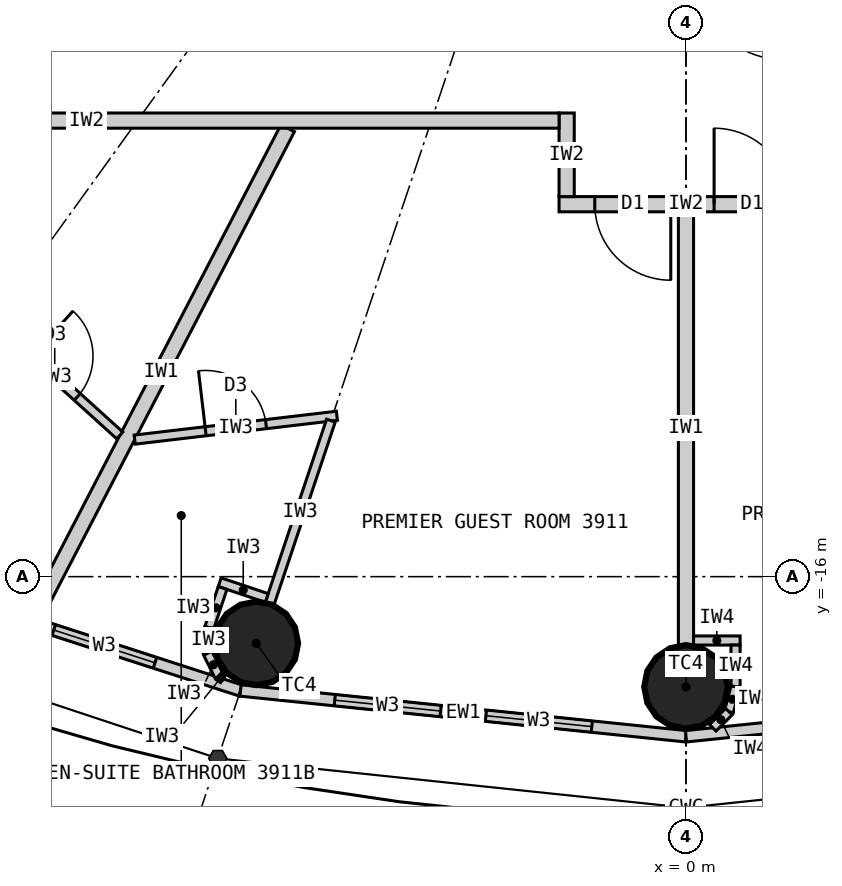
"""IFC4 building model, lengths in metres.
Left out: names, types, materials, properties, quantities, classifications, styles, units other than length and angle.
Written with IfcOpenShell. Run it as: python <this file> out.ifc"""

import sys

from ifc_helpers import new_model, si_unit, direction, frame, frame_2d, origin, origin_2d, place, context, subcontext, project, spatial, rectangle, circle, extrude, element, fill, save


model = new_model("IFC4")
c1 = context("Model", 3, precision=1e-05, world=origin(), true_north=direction((0.0, 1.0)))
c2 = subcontext(c1, "Body", "Model", "MODEL_VIEW")
j1 = project(units=[si_unit("LENGTHUNIT", "METRE"), si_unit("PLANEANGLEUNIT", "RADIAN")], contexts=[c1])
p1 = place(None, origin())
s1 = spatial("IfcSite", under=j1, at=p1, CompositionType="ELEMENT")
p2 = place(p1, origin())
s2 = spatial("IfcBuilding", under=s1, at=p2, CompositionType="ELEMENT")
p3 = place(p2, frame((0.0, 0.0, 150.0)))
s3 = spatial("IfcBuildingStorey", under=s2, at=p3, CompositionType="ELEMENT", Elevation=150.0)
for number, where, z_axis, x_axis in (
    (1, (-5.653, -16.877, 0.0), (0.0, 0.0, 1.0), (1.0, 0.0, 0.0)),
    (2, (0.0, -17.45, 0.0), (0.0, 0.0, 1.0), (1.0, 0.0, 0.0)),
):
    element("IfcColumn", number, at=place(p3, frame(where, z_axis=z_axis, x_axis=x_axis)), inside=s3, PredefinedType="COLUMN", context=c2, shape_type="SweptSolid", body=[
        extrude(circle(Radius=0.55, at=origin_2d()), origin(), (0.0, 0.0, 1.0), 3.3),
    ])
p4 = place(p3, frame((-11.346, -15.722, 0.0), z_axis=(0.0, 0.0, 1.0), x_axis=(0.951432482129, -0.307857486429, 0.0)))
e3 = element("IfcWall", 3, at=p4, inside=s3, PredefinedType="ELEMENTEDWALL", context=c2, shape_type="SweptSolid", body=[
    extrude(rectangle(XDim=5.766, YDim=0.15, at=frame_2d((2.883, 0.0))), origin(), (0.0, 0.0, 1.0), 3.12),
])
p5 = place(p4, frame((1.183, 0.0, 0.9)))
e4 = element("IfcOpeningElement", 4, at=p5, cuts=e3, PredefinedType="OPENING", context=c2, shape_type="SweptSolid", body=[
    extrude(rectangle(XDim=1.4, YDim=1.9, at=frame_2d((0.7, 0.95))), frame((0.0, 0.085, 0.0), z_axis=(0.0, -1.0, 0.0), x_axis=(1.0, 0.0, 0.0)), (0.0, 0.0, 1.0), 0.17),
])
p6 = place(p4, frame((3.183, 0.0, 0.9)))
e5 = element("IfcOpeningElement", 5, at=p6, cuts=e3, PredefinedType="OPENING", context=c2, shape_type="SweptSolid", body=[
    extrude(rectangle(XDim=1.4, YDim=1.9, at=frame_2d((0.7, 0.95))), frame((0.0, 0.085, 0.0), z_axis=(0.0, -1.0, 0.0), x_axis=(1.0, 0.0, 0.0)), (0.0, 0.0, 1.0), 0.17),
])
p7 = place(p3, frame((-5.86, -17.497, 0.0), z_axis=(0.0, 0.0, 1.0), x_axis=(0.994751738032, -0.102318032045, 0.0)))
e6 = element("IfcWall", 6, at=p7, inside=s3, PredefinedType="ELEMENTEDWALL", context=c2, shape_type="SweptSolid", body=[
    extrude(rectangle(XDim=5.891, YDim=0.15, at=frame_2d((2.946, 0.0))), origin(), (0.0, 0.0, 1.0), 3.12),
])
p8 = place(p7, frame((1.246, 0.0, 0.9)))
e7 = element("IfcOpeningElement", 7, at=p8, cuts=e6, PredefinedType="OPENING", context=c2, shape_type="SweptSolid", body=[
    extrude(rectangle(XDim=1.4, YDim=1.9, at=frame_2d((0.7, 0.95))), frame((0.0, 0.085, 0.0), z_axis=(0.0, -1.0, 0.0), x_axis=(1.0, 0.0, 0.0)), (0.0, 0.0, 1.0), 0.17),
])
p9 = place(p7, frame((3.246, 0.0, 0.9)))
e8 = element("IfcOpeningElement", 8, at=p9, cuts=e6, PredefinedType="OPENING", context=c2, shape_type="SweptSolid", body=[
    extrude(rectangle(XDim=1.4, YDim=1.9, at=frame_2d((0.7, 0.95))), frame((0.0, 0.085, 0.0), z_axis=(0.0, -1.0, 0.0), x_axis=(1.0, 0.0, 0.0)), (0.0, 0.0, 1.0), 0.17),
])
p10 = place(p3, frame((0.0, -18.1, 0.0), z_axis=(0.0, 0.0, 1.0), x_axis=(0.994751738032, 0.102318032045, 0.0)))
e9 = element("IfcWall", 9, at=p10, inside=s3, PredefinedType="ELEMENTEDWALL", context=c2, shape_type="SweptSolid", body=[
    extrude(rectangle(XDim=5.891, YDim=0.15, at=frame_2d((2.946, 0.0))), origin(), (0.0, 0.0, 1.0), 3.12),
])
p11 = place(p10, frame((1.246, 0.0, 0.9)))
e10 = element("IfcOpeningElement", 10, at=p11, cuts=e9, PredefinedType="OPENING", context=c2, shape_type="SweptSolid", body=[
    extrude(rectangle(XDim=1.4, YDim=1.9, at=frame_2d((0.7, 0.95))), frame((0.0, 0.085, 0.0), z_axis=(0.0, -1.0, 0.0), x_axis=(1.0, 0.0, 0.0)), (0.0, 0.0, 1.0), 0.17),
])
p12 = place(p10, frame((3.246, 0.0, 0.9)))
e11 = element("IfcOpeningElement", 11, at=p12, cuts=e9, PredefinedType="OPENING", context=c2, shape_type="SweptSolid", body=[
    extrude(rectangle(XDim=1.4, YDim=1.9, at=frame_2d((0.7, 0.95))), frame((0.0, 0.085, 0.0), z_axis=(0.0, -1.0, 0.0), x_axis=(1.0, 0.0, 0.0)), (0.0, 0.0, 1.0), 0.17),
])
p13 = place(p3, frame((-5.24, -10.1, 0.0), z_axis=(0.0, 0.0, 1.0), x_axis=(-0.460532965373, -0.887642601391, 0.0)))
e12 = element("IfcWall", 12, at=p13, inside=s3, PredefinedType="PARTITIONING", context=c2, shape_type="SweptSolid", body=[
    extrude(rectangle(XDim=7.231, YDim=0.2, at=frame_2d((3.616, 0.0))), origin(), (0.0, 0.0, 1.0), 3.12),
])
p14 = place(p3, frame((0.0, -11.2, 0.0), z_axis=(0.0, 0.0, 1.0), x_axis=(0.0, -1.0, 0.0)))
e13 = element("IfcWall", 13, at=p14, inside=s3, PredefinedType="PARTITIONING", context=c2, shape_type="SweptSolid", body=[
    extrude(rectangle(XDim=5.7, YDim=0.2, at=frame_2d((2.85, 0.0))), origin(), (0.0, 0.0, 1.0), 2.42),
])
p15 = place(p3, frame((1.67, -11.1, 0.0), z_axis=(0.0, 0.0, 1.0), x_axis=(-1.0, 0.0, 0.0)))
e14 = element("IfcWall", 14, at=p15, inside=s3, PredefinedType="PARTITIONING", context=c2, shape_type="SweptSolid", body=[
    extrude(rectangle(XDim=3.34, YDim=0.2, at=frame_2d((1.67, 0.0))), origin(), (0.0, 0.0, 1.0), 3.12),
])
p16 = place(p15, frame((1.87, 0.0, 0.0)))
e15 = element("IfcOpeningElement", 15, at=p16, cuts=e14, PredefinedType="OPENING", context=c2, shape_type="SweptSolid", body=[
    extrude(rectangle(XDim=1.0, YDim=2.2, at=frame_2d((0.5, 1.1))), frame((0.0, 0.11, 0.0), z_axis=(0.0, -1.0, 0.0), x_axis=(1.0, 0.0, 0.0)), (0.0, 0.0, 1.0), 0.22),
])
p17 = place(p15, frame((0.3, 0.0, 0.0)))
e16 = element("IfcOpeningElement", 16, at=p17, cuts=e14, PredefinedType="OPENING", context=c2, shape_type="SweptSolid", body=[
    extrude(rectangle(XDim=1.0, YDim=2.2, at=frame_2d((0.5, 1.1))), frame((0.0, 0.11, 0.0), z_axis=(0.0, -1.0, 0.0), x_axis=(1.0, 0.0, 0.0)), (0.0, 0.0, 1.0), 0.22),
])
p18 = place(p3, frame((-1.57, -9.9, 0.0), z_axis=(0.0, 0.0, 1.0), x_axis=(0.0, -1.0, 0.0)))
e17 = element("IfcWall", 17, at=p18, inside=s3, PredefinedType="PARTITIONING", context=c2, shape_type="SweptSolid", body=[
    extrude(rectangle(XDim=1.1, YDim=0.2, at=frame_2d((0.55, 0.0))), origin(), (0.0, 0.0, 1.0), 3.12),
])
p19 = place(p3, frame((-7.45, -14.142, 0.0), z_axis=(0.0, 0.0, 1.0), x_axis=(-0.74113984586, 0.671350675041, 0.0)))
e18 = element("IfcWall", 18, at=p19, inside=s3, PredefinedType="PARTITIONING", context=c2, shape_type="SweptSolid", body=[
    extrude(rectangle(XDim=2.309, YDim=0.12, at=frame_2d((1.154, 0.0))), origin(), (0.0, 0.0, 1.0), 3.12),
])
p20 = place(p19, frame((0.754, 0.0, 0.0)))
e19 = element("IfcOpeningElement", 19, at=p20, cuts=e18, PredefinedType="OPENING", context=c2, shape_type="SweptSolid", body=[
    extrude(rectangle(XDim=0.8, YDim=2.1, at=frame_2d((0.4, 1.05))), frame((0.0, 0.07, 0.0), z_axis=(0.0, -1.0, 0.0), x_axis=(1.0, 0.0, 0.0)), (0.0, 0.0, 1.0), 0.14),
])
p21 = place(p3, frame((-7.253, -14.197, 0.0), z_axis=(0.0, 0.0, 1.0), x_axis=(0.993128188393, 0.117031625725, 0.0)))
e20 = element("IfcWall", 20, at=p21, inside=s3, PredefinedType="PARTITIONING", context=c2, shape_type="SweptSolid", body=[
    extrude(rectangle(XDim=2.678, YDim=0.12, at=frame_2d((1.339, 0.0))), origin(), (0.0, 0.0, 1.0), 3.12),
])
p22 = place(p21, frame((0.939, 0.0, 0.0)))
e21 = element("IfcOpeningElement", 21, at=p22, cuts=e20, PredefinedType="OPENING", context=c2, shape_type="SweptSolid", body=[
    extrude(rectangle(XDim=0.8, YDim=2.1, at=frame_2d((0.4, 1.05))), frame((0.0, 0.07, 0.0), z_axis=(0.0, -1.0, 0.0), x_axis=(1.0, 0.0, 0.0)), (0.0, 0.0, 1.0), 0.14),
])
p23 = place(p3, frame((-4.671, -13.948, 0.0), z_axis=(0.0, 0.0, 1.0), x_axis=(-0.317669167093, -0.948201613729, 0.0)))
e22 = element("IfcWall", 22, at=p23, inside=s3, PredefinedType="PARTITIONING", context=c2, shape_type="SweptSolid", body=[
    extrude(rectangle(XDim=2.54, YDim=0.12, at=frame_2d((1.27, 0.0))), origin(), (0.0, 0.0, 1.0), 2.42),
])
p24 = place(p3, frame((-5.516, -16.28, 0.0), z_axis=(0.0, 0.0, 1.0), x_axis=(-0.948157944392, 0.317799484717, 0.0)))
e23 = element("IfcWall", 23, at=p24, inside=s3, PredefinedType="PARTITIONING", context=c2, shape_type="SweptSolid", body=[
    extrude(rectangle(XDim=0.652, YDim=0.12, at=frame_2d((0.326, 0.0))), origin(), (0.0, 0.0, 1.0), 3.12),
])
p25 = place(p3, frame((-6.097, -16.149, 0.0), z_axis=(0.0, 0.0, 1.0), x_axis=(-0.317292604854, -0.948327687514, 0.0)))
e24 = element("IfcWall", 24, at=p25, inside=s3, PredefinedType="PARTITIONING", context=c2, shape_type="SweptSolid", body=[
    extrude(rectangle(XDim=0.55, YDim=0.12, at=frame_2d((0.275, 0.0))), origin(), (0.0, 0.0, 1.0), 3.12),
])
for number, where, z_axis, x_axis in (
    (25, (-6.271, -16.67, 0.0), (0.0, 0.0, 1.0), (-0.061, -0.998, 0.0)),
    (26, (-6.292, -17.007, 0.0), (0.0, 0.0, 1.0), (0.445, -0.895, 0.0)),
):
    element("IfcWall", number, at=place(p3, frame(where, z_axis=z_axis, x_axis=x_axis)), inside=s3, PredefinedType="PARTITIONING", context=c2, shape_type="SweptSolid", body=[
        extrude(rectangle(XDim=0.338, YDim=0.12, at=frame_2d((0.169, 0.0))), origin(), (0.0, 0.0, 1.0), 3.12),
    ])
p26 = place(p3, frame((-6.142, -17.31, 0.0), z_axis=(0.0, 0.0, 1.0), x_axis=(0.835039693181, -0.550189704386, 0.0)))
e27 = element("IfcWall", 27, at=p26, inside=s3, PredefinedType="PARTITIONING", context=c2, shape_type="SweptSolid", body=[
    extrude(rectangle(XDim=0.062, YDim=0.12, at=frame_2d((0.031, 0.0))), origin(), (0.0, 0.0, 1.0), 3.12),
])
p27 = place(p3, frame((-1.67, -10.0, 0.0), z_axis=(0.0, 0.0, 1.0), x_axis=(-1.0, 0.0, 0.0)))
e28 = element("IfcWall", 28, at=p27, inside=s3, PredefinedType="PARTITIONING", context=c2, shape_type="SweptSolid", body=[
    extrude(rectangle(XDim=12.43, YDim=0.2, at=frame_2d((6.215, 0.0))), origin(), (0.0, 0.0, 1.0), 3.12),
])
p28 = place(p27, frame((9.655, 0.0, 0.0)))
e29 = element("IfcOpeningElement", 29, at=p28, cuts=e28, PredefinedType="OPENING", context=c2, shape_type="SweptSolid", body=[
    extrude(rectangle(XDim=1.0, YDim=2.2, at=frame_2d((0.5, 1.1))), frame((0.0, 0.11, 0.0), z_axis=(0.0, -1.0, 0.0), x_axis=(1.0, 0.0, 0.0)), (0.0, 0.0, 1.0), 0.22),
])
p29 = place(p3, frame((0.1, -16.84, 0.0), z_axis=(0.0, 0.0, 1.0), x_axis=(1.0, 0.0, 0.0)))
e30 = element("IfcWall", 30, at=p29, inside=s3, PredefinedType="PARTITIONING", context=c2, shape_type="SweptSolid", body=[
    extrude(rectangle(XDim=0.612, YDim=0.12, at=frame_2d((0.306, 0.0))), origin(), (0.0, 0.0, 1.0), 3.12),
])
p30 = place(p3, frame((0.652, -16.9, 0.0), z_axis=(0.0, 0.0, 1.0), x_axis=(0.0, -1.0, 0.0)))
e31 = element("IfcWall", 31, at=p30, inside=s3, PredefinedType="PARTITIONING", context=c2, shape_type="SweptSolid", body=[
    extrude(rectangle(XDim=0.55, YDim=0.12, at=frame_2d((0.275, 0.0))), origin(), (0.0, 0.0, 1.0), 3.12),
])
p31 = place(p3, frame((0.652, -17.45, 0.0), z_axis=(0.0, 0.0, 1.0), x_axis=(-0.258832454679, -0.965922233104, 0.0)))
e32 = element("IfcWall", 32, at=p31, inside=s3, PredefinedType="PARTITIONING", context=c2, shape_type="SweptSolid", body=[
    extrude(rectangle(XDim=0.338, YDim=0.12, at=frame_2d((0.169, 0.0))), origin(), (0.0, 0.0, 1.0), 3.12),
])
p32 = place(p3, frame((0.565, -17.776, 0.0), z_axis=(0.0, 0.0, 1.0), x_axis=(-0.707106781187, -0.707106781187, 0.0)))
e33 = element("IfcWall", 33, at=p32, inside=s3, PredefinedType="PARTITIONING", context=c2, shape_type="SweptSolid", body=[
    extrude(rectangle(XDim=0.301, YDim=0.12, at=frame_2d((0.15, 0.0))), origin(), (0.0, 0.0, 1.0), 3.12),
])
p33 = place(p6, origin())
e34 = element("IfcWindow", 34, at=p33, inside=s3, PartitioningType="SINGLE_PANEL", PredefinedType="WINDOW", context=c2, shape_type="SweptSolid", body=[
    extrude(rectangle(XDim=1.4, YDim=1.9, at=frame_2d((0.7, 0.95))), frame((0.0, 0.03, 0.0), z_axis=(0.0, -1.0, 0.0), x_axis=(1.0, 0.0, 0.0)), (0.0, 0.0, 1.0), 0.06),
])
fill(e5, e34)
p34 = place(p8, origin())
e35 = element("IfcWindow", 35, at=p34, inside=s3, PartitioningType="SINGLE_PANEL", PredefinedType="WINDOW", context=c2, shape_type="SweptSolid", body=[
    extrude(rectangle(XDim=1.4, YDim=1.9, at=frame_2d((0.7, 0.95))), frame((0.0, 0.03, 0.0), z_axis=(0.0, -1.0, 0.0), x_axis=(1.0, 0.0, 0.0)), (0.0, 0.0, 1.0), 0.06),
])
fill(e7, e35)
p35 = place(p9, origin())
e36 = element("IfcWindow", 36, at=p35, inside=s3, PartitioningType="SINGLE_PANEL", PredefinedType="WINDOW", context=c2, shape_type="SweptSolid", body=[
    extrude(rectangle(XDim=1.4, YDim=1.9, at=frame_2d((0.7, 0.95))), frame((0.0, 0.03, 0.0), z_axis=(0.0, -1.0, 0.0), x_axis=(1.0, 0.0, 0.0)), (0.0, 0.0, 1.0), 0.06),
])
fill(e8, e36)
p36 = place(p20, origin())
e37 = element("IfcDoor", 37, at=p36, inside=s3, OperationType="SINGLE_SWING_RIGHT", PredefinedType="DOOR", context=c2, shape_type="SweptSolid", body=[
    extrude(rectangle(XDim=0.8, YDim=2.1, at=frame_2d((0.4, 1.05))), frame((0.0, 0.025, 0.0), z_axis=(0.0, -1.0, 0.0), x_axis=(1.0, 0.0, 0.0)), (0.0, 0.0, 1.0), 0.05),
])
fill(e19, e37)
p37 = place(p22, origin())
e38 = element("IfcDoor", 38, at=p37, inside=s3, OperationType="SINGLE_SWING_LEFT", PredefinedType="DOOR", context=c2, shape_type="SweptSolid", body=[
    extrude(rectangle(XDim=0.8, YDim=2.1, at=frame_2d((0.4, 1.05))), frame((0.0, 0.025, 0.0), z_axis=(0.0, -1.0, 0.0), x_axis=(1.0, 0.0, 0.0)), (0.0, 0.0, 1.0), 0.05),
])
fill(e21, e38)
p38 = place(p16, origin())
e39 = element("IfcDoor", 39, at=p38, inside=s3, OperationType="SINGLE_SWING_LEFT", PredefinedType="DOOR", context=c2, shape_type="SweptSolid", body=[
    extrude(rectangle(XDim=1.0, YDim=2.2, at=frame_2d((0.5, 1.1))), frame((0.0, 0.025, 0.0), z_axis=(0.0, -1.0, 0.0), x_axis=(1.0, 0.0, 0.0)), (0.0, 0.0, 1.0), 0.05),
])
fill(e15, e39)
p39 = place(p17, origin())
e40 = element("IfcDoor", 40, at=p39, inside=s3, OperationType="SINGLE_SWING_RIGHT", PredefinedType="DOOR", context=c2, shape_type="SweptSolid", body=[
    extrude(rectangle(XDim=1.0, YDim=2.2, at=frame_2d((0.5, 1.1))), frame((0.0, 0.025, 0.0), z_axis=(0.0, -1.0, 0.0), x_axis=(1.0, 0.0, 0.0)), (0.0, 0.0, 1.0), 0.05),
])
fill(e16, e40)
save(model, sys.argv[1])
